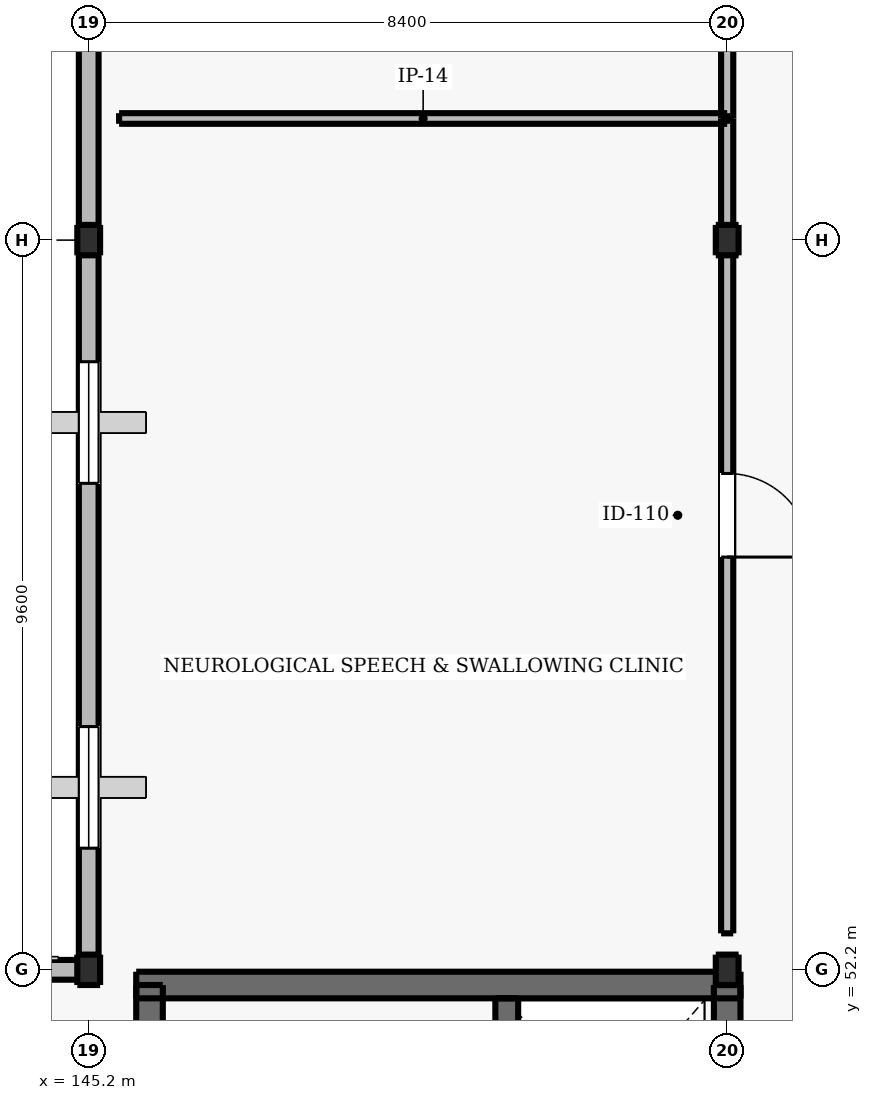
"""IFC4 building model, lengths in metres.
Left out: names, types, materials, properties, quantities, classifications, styles, units other than length and angle.
Written with IfcOpenShell. Run it as: python <this file> out.ifc"""

import sys

from ifc_helpers import new_model, si_unit, direction, frame, frame_2d, origin, origin_2d, place, context, subcontext, project, spatial, rectangle, i_section, extrude, element, fill, save


model = new_model("IFC4")
c1 = context("Model", 3, precision=1e-05, world=origin(), true_north=direction((0.0, 1.0)))
c2 = subcontext(c1, "Body", "Model", "MODEL_VIEW")
j1 = project(units=[si_unit("LENGTHUNIT", "METRE"), si_unit("PLANEANGLEUNIT", "RADIAN")], contexts=[c1])
p1 = place(None, origin())
s1 = spatial("IfcSite", under=j1, at=p1, CompositionType="ELEMENT")
p2 = place(p1, origin())
s2 = spatial("IfcBuilding", under=s1, at=p2, CompositionType="ELEMENT")
p3 = place(p2, frame((0.0, 0.0, 9.6)))
s3 = spatial("IfcBuildingStorey", under=s2, at=p3, CompositionType="ELEMENT", Elevation=9.6)
for number, where, z_axis, x_axis in (
    (1, (145.2, 52.2, 0.0), (0.0, 0.0, 1.0), (1.0, 0.0, 0.0)),
    (2, (145.2, 61.8, 0.0), (0.0, 0.0, 1.0), (1.0, 0.0, 0.0)),
    (3, (153.6, 52.2, 0.0), (0.0, 0.0, 1.0), (1.0, 0.0, 0.0)),
    (4, (153.6, 61.8, 0.0), (0.0, 0.0, 1.0), (1.0, 0.0, 0.0)),
):
    element("IfcColumn", number, at=place(p3, frame(where, z_axis=z_axis, x_axis=x_axis)), inside=s3, PredefinedType="COLUMN", context=c2, shape_type="SweptSolid", body=[
        extrude(i_section(OverallWidth=0.3, OverallDepth=0.4, WebThickness=0.013, FlangeThickness=0.024, FilletRadius=0.027, at=origin_2d()), origin(), (0.0, 0.0, 1.0), 4.2),
    ])
p4 = place(p3, frame((145.825, 52.0, 0.0), z_axis=(0.0, 0.0, 1.0), x_axis=(1.0, 0.0, 0.0)))
e5 = element("IfcWall", 5, at=p4, inside=s3, PredefinedType="SHEAR", context=c2, shape_type="SweptSolid", body=[
    extrude(rectangle(XDim=7.95, YDim=0.35, at=frame_2d((3.975, 0.0))), origin(), (0.0, 0.0, 1.0), 4.2),
])
for number, where, z_axis, x_axis in (
    (6, (146.0, 45.2, 0.0), (0.0, 0.0, 1.0), (0.0, 1.0, 0.0)),
    (7, (153.6, 45.2, 0.0), (0.0, 0.0, 1.0), (0.0, 1.0, 0.0)),
):
    element("IfcWall", number, at=place(p3, frame(where, z_axis=z_axis, x_axis=x_axis)), inside=s3, PredefinedType="SHEAR", context=c2, shape_type="SweptSolid", body=[
        extrude(rectangle(XDim=6.8, YDim=0.35, at=frame_2d((3.4, 0.0))), origin(), (0.0, 0.0, 1.0), 4.2),
    ])
p5 = place(p3, frame((150.7, 48.8, 0.0), z_axis=(0.0, 0.0, 1.0), x_axis=(0.0, 1.0, 0.0)))
e8 = element("IfcWall", 8, at=p5, inside=s3, PredefinedType="SHEAR", context=c2, shape_type="SweptSolid", body=[
    extrude(rectangle(XDim=3.025, YDim=0.3, at=frame_2d((1.512, 0.0))), origin(), (0.0, 0.0, 1.0), 4.2),
])
p6 = place(p5, frame((0.963, 0.0, 0.0)))
e9 = element("IfcOpeningElement", 9, at=p6, cuts=e8, PredefinedType="OPENING", context=c2, shape_type="SweptSolid", body=[
    extrude(rectangle(XDim=1.1, YDim=2.15, at=frame_2d((0.55, 1.075))), frame((0.0, 0.16, 0.0), z_axis=(0.0, -1.0, 0.0), x_axis=(1.0, 0.0, 0.0)), (0.0, 0.0, 1.0), 0.32),
])
p7 = place(p3, frame((145.2, 52.2, 0.0), z_axis=(0.0, 0.0, 1.0), x_axis=(0.0, 1.0, 0.0)))
e10 = element("IfcWall", 10, at=p7, inside=s3, PredefinedType="SOLIDWALL", context=c2, shape_type="SweptSolid", body=[
    extrude(rectangle(XDim=28.8, YDim=0.26, at=frame_2d((14.4, 0.0))), origin(), (0.0, 0.0, 1.0), 3.53),
])
p8 = place(p7, frame((1.6, 0.0, 0.965)))
e11 = element("IfcOpeningElement", 11, at=p8, cuts=e10, PredefinedType="OPENING", context=c2, shape_type="SweptSolid", body=[
    extrude(rectangle(XDim=1.6, YDim=1.6, at=frame_2d((0.8, 0.8))), frame((0.0, 0.14, 0.0), z_axis=(0.0, -1.0, 0.0), x_axis=(1.0, 0.0, 0.0)), (0.0, 0.0, 1.0), 0.28),
])
p9 = place(p7, frame((6.4, 0.0, 0.965)))
e12 = element("IfcOpeningElement", 12, at=p9, cuts=e10, PredefinedType="OPENING", context=c2, shape_type="SweptSolid", body=[
    extrude(rectangle(XDim=1.6, YDim=1.6, at=frame_2d((0.8, 0.8))), frame((0.0, 0.14, 0.0), z_axis=(0.0, -1.0, 0.0), x_axis=(1.0, 0.0, 0.0)), (0.0, 0.0, 1.0), 0.28),
])
p10 = place(p7, frame((16.0, 0.0, 0.965)))
e13 = element("IfcOpeningElement", 13, at=p10, cuts=e10, PredefinedType="OPENING", context=c2, shape_type="SweptSolid", body=[
    extrude(rectangle(XDim=1.6, YDim=1.6, at=frame_2d((0.8, 0.8))), frame((0.0, 0.14, 0.0), z_axis=(0.0, -1.0, 0.0), x_axis=(1.0, 0.0, 0.0)), (0.0, 0.0, 1.0), 0.28),
])
p11 = place(p7, frame((25.6, 0.0, 0.965)))
e14 = element("IfcOpeningElement", 14, at=p11, cuts=e10, PredefinedType="OPENING", context=c2, shape_type="SweptSolid", body=[
    extrude(rectangle(XDim=1.6, YDim=1.6, at=frame_2d((0.8, 0.8))), frame((0.0, 0.14, 0.0), z_axis=(0.0, -1.0, 0.0), x_axis=(1.0, 0.0, 0.0)), (0.0, 0.0, 1.0), 0.28),
])
p12 = place(p3, frame((128.4, 52.2, 0.0), z_axis=(0.0, 0.0, 1.0), x_axis=(1.0, 0.0, 0.0)))
e15 = element("IfcWall", 15, at=p12, inside=s3, PredefinedType="SOLIDWALL", context=c2, shape_type="SweptSolid", body=[
    extrude(rectangle(XDim=16.8, YDim=0.26, at=frame_2d((8.4, 0.0))), origin(), (0.0, 0.0, 1.0), 3.53),
])
p13 = place(p12, frame((2.0, 0.0, 0.965)))
e16 = element("IfcOpeningElement", 16, at=p13, cuts=e15, PredefinedType="OPENING", context=c2, shape_type="SweptSolid", body=[
    extrude(rectangle(XDim=1.6, YDim=1.6, at=frame_2d((0.8, 0.8))), frame((0.0, 0.14, 0.0), z_axis=(0.0, -1.0, 0.0), x_axis=(1.0, 0.0, 0.0)), (0.0, 0.0, 1.0), 0.28),
])
p14 = place(p12, frame((13.2, 0.0, 0.965)))
e17 = element("IfcOpeningElement", 17, at=p14, cuts=e15, PredefinedType="OPENING", context=c2, shape_type="SweptSolid", body=[
    extrude(rectangle(XDim=1.6, YDim=1.6, at=frame_2d((0.8, 0.8))), frame((0.0, 0.14, 0.0), z_axis=(0.0, -1.0, 0.0), x_axis=(1.0, 0.0, 0.0)), (0.0, 0.0, 1.0), 0.28),
])
p15 = place(p3, frame((153.6, 52.68, 0.0), z_axis=(0.0, 0.0, 1.0), x_axis=(0.0, 1.0, 0.0)))
e18 = element("IfcWall", 18, at=p15, inside=s3, PredefinedType="PARTITIONING", context=c2, shape_type="SweptSolid", body=[
    extrude(rectangle(XDim=10.72, YDim=0.16, at=frame_2d((5.36, 0.0))), origin(), (0.0, 0.0, 1.0), 3.53),
])
p16 = place(p15, frame((4.95, 0.0, 0.0)))
e19 = element("IfcOpeningElement", 19, at=p16, cuts=e18, PredefinedType="OPENING", context=c2, shape_type="SweptSolid", body=[
    extrude(rectangle(XDim=1.1, YDim=2.15, at=frame_2d((0.55, 1.075))), frame((0.0, 0.09, 0.0), z_axis=(0.0, -1.0, 0.0), x_axis=(1.0, 0.0, 0.0)), (0.0, 0.0, 1.0), 0.18),
])
p17 = place(p3, frame((145.6, 63.4, 0.0), z_axis=(0.0, 0.0, 1.0), x_axis=(1.0, 0.0, 0.0)))
e20 = element("IfcWall", 20, at=p17, inside=s3, PredefinedType="PARTITIONING", context=c2, shape_type="SweptSolid", body=[
    extrude(rectangle(XDim=8.0, YDim=0.14, at=frame_2d((4.0, 0.0))), origin(), (0.0, 0.0, 1.0), 3.93),
])
p18 = place(p3, frame((153.6, 63.4, 0.0), z_axis=(0.0, 0.0, 1.0), x_axis=(0.0, 1.0, 0.0)))
e21 = element("IfcWall", 21, at=p18, inside=s3, PredefinedType="PARTITIONING", context=c2, shape_type="SweptSolid", body=[
    extrude(rectangle(XDim=11.2, YDim=0.16, at=frame_2d((5.6, 0.0))), origin(), (0.0, 0.0, 1.0), 3.53),
])
p19 = place(p18, frame((5.05, 0.0, 0.0)))
e22 = element("IfcOpeningElement", 22, at=p19, cuts=e21, PredefinedType="OPENING", context=c2, shape_type="SweptSolid", body=[
    extrude(rectangle(XDim=1.1, YDim=2.15, at=frame_2d((0.55, 1.075))), frame((0.0, 0.09, 0.0), z_axis=(0.0, -1.0, 0.0), x_axis=(1.0, 0.0, 0.0)), (0.0, 0.0, 1.0), 0.18),
])
p20 = place(p8, origin())
e23 = element("IfcWindow", 23, at=p20, inside=s3, PartitioningType="SINGLE_PANEL", PredefinedType="WINDOW", context=c2, shape_type="SweptSolid", body=[
    extrude(rectangle(XDim=1.6, YDim=1.6, at=frame_2d((0.8, 0.8))), frame((0.0, 0.03, 0.0), z_axis=(0.0, -1.0, 0.0), x_axis=(1.0, 0.0, 0.0)), (0.0, 0.0, 1.0), 0.06),
])
fill(e11, e23)
p21 = place(p9, origin())
e24 = element("IfcWindow", 24, at=p21, inside=s3, PartitioningType="SINGLE_PANEL", PredefinedType="WINDOW", context=c2, shape_type="SweptSolid", body=[
    extrude(rectangle(XDim=1.6, YDim=1.6, at=frame_2d((0.8, 0.8))), frame((0.0, 0.03, 0.0), z_axis=(0.0, -1.0, 0.0), x_axis=(1.0, 0.0, 0.0)), (0.0, 0.0, 1.0), 0.06),
])
fill(e12, e24)
p22 = place(p16, frame((1.1, 0.0, 0.0), z_axis=(0.0, 0.0, 1.0), x_axis=(-1.0, 0.0, 0.0)))
e25 = element("IfcDoor", 25, at=p22, inside=s3, OperationType="SINGLE_SWING_LEFT", PredefinedType="DOOR", context=c2, shape_type="SweptSolid", body=[
    extrude(rectangle(XDim=1.1, YDim=2.15, at=frame_2d((0.55, 1.075))), frame((0.0, 0.025, 0.0), z_axis=(0.0, -1.0, 0.0), x_axis=(1.0, 0.0, 0.0)), (0.0, 0.0, 1.0), 0.05),
])
fill(e19, e25)
save(model, sys.argv[1])
